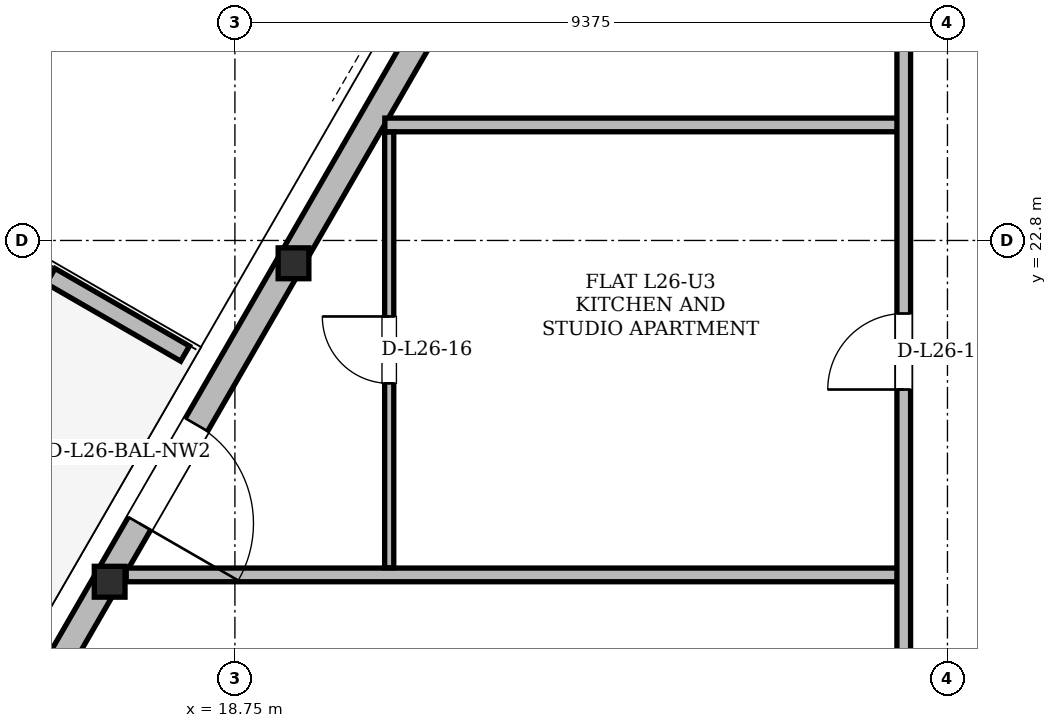
"""IFC4 building model, lengths in metres.
Left out: names, types, materials, properties, quantities, classifications, styles, units other than length and angle.
Written with IfcOpenShell. Run it as: python <this file> out.ifc"""

import sys

from ifc_helpers import new_model, si_unit, direction, frame, frame_2d, origin, origin_2d, place, context, subcontext, project, spatial, polyline, rectangle, i_section, outline, extrude, element, fill, save


model = new_model("IFC4")
c1 = context("Model", 3, precision=1e-05, world=origin(), true_north=direction((0.0, 1.0)))
c2 = subcontext(c1, "Body", "Model", "MODEL_VIEW")
j1 = project(units=[si_unit("LENGTHUNIT", "METRE"), si_unit("PLANEANGLEUNIT", "RADIAN")], contexts=[c1])
p1 = place(None, origin())
s1 = spatial("IfcSite", under=j1, at=p1, CompositionType="ELEMENT")
p2 = place(p1, origin())
s2 = spatial("IfcBuilding", under=s1, at=p2, CompositionType="ELEMENT")
p3 = place(p2, frame((0.0, 0.0, 100.5)))
s3 = spatial("IfcBuildingStorey", under=s2, at=p3, CompositionType="ELEMENT", Elevation=100.5)
p4 = place(p3, frame((19.487, 22.528, 0.004), z_axis=(0.018758346864, -0.015903815819, 0.999697550795), x_axis=(0.646685251635, 0.762756963467, 0.0)))
e1 = element("IfcColumn", 1, at=p4, inside=s3, PredefinedType="COLUMN", context=c2, shape_type="SweptSolid", body=[
    extrude(i_section(OverallWidth=0.404, OverallDepth=0.406, WebThickness=0.027, FlangeThickness=0.044, at=origin_2d()), origin(), (0.0, 0.0, 1.0), 3.592),
])
p5 = place(p3, frame((17.071, 18.344, 0.004), z_axis=(0.01726279285, -0.018554104126, 0.999678819023), x_axis=(0.732124530996, 0.681170809059, 0.0)))
e2 = element("IfcColumn", 2, at=p5, inside=s3, PredefinedType="COLUMN", context=c2, shape_type="SweptSolid", body=[
    extrude(i_section(OverallWidth=0.404, OverallDepth=0.406, WebThickness=0.027, FlangeThickness=0.044, at=origin_2d()), origin(), (0.0, 0.0, 1.0), 3.592),
])
p6 = place(p3, frame((31.568, 43.453, 0.0), z_axis=(0.0, 0.0, 1.0), x_axis=(-0.500002056916, -0.86602421622, 0.0)))
e3 = element("IfcWall", 3, at=p6, inside=s3, PredefinedType="SOLIDWALL", context=c2, shape_type="SweptSolid", body=[
    extrude(rectangle(XDim=34.516, YDim=0.34, at=frame_2d((17.258, 0.0))), origin(), (0.0, 0.0, 1.0), 2.578),
])
p7 = place(p6, frame((8.034, 0.0, 0.0)))
e4 = element("IfcOpeningElement", 4, at=p7, cuts=e3, PredefinedType="OPENING", context=c2, shape_type="SweptSolid", body=[
    extrude(rectangle(XDim=1.5, YDim=2.2, at=frame_2d((0.75, 1.1))), frame((0.0, 0.17, 0.0), z_axis=(0.0, -1.0, 0.0), x_axis=(1.0, 0.0, 0.0)), (0.0, 0.0, 1.0), 0.34),
])
p8 = place(p6, frame((26.647, 0.0, 0.0)))
e5 = element("IfcOpeningElement", 5, at=p8, cuts=e3, PredefinedType="OPENING", context=c2, shape_type="SweptSolid", body=[
    extrude(rectangle(XDim=1.5, YDim=2.2, at=frame_2d((0.75, 1.1))), frame((0.0, 0.17, 0.0), z_axis=(0.0, -1.0, 0.0), x_axis=(1.0, 0.0, 0.0)), (0.0, 0.0, 1.0), 0.34),
])
p9 = place(p6, frame((31.672, 0.0, 0.85)))
e6 = element("IfcOpeningElement", 6, at=p9, cuts=e3, PredefinedType="OPENING", context=c2, shape_type="SweptSolid", body=[
    extrude(rectangle(XDim=1.6, YDim=1.618, at=frame_2d((0.8, 0.809))), frame((0.0, 0.17, 0.0), z_axis=(0.0, -1.0, 0.0), x_axis=(1.0, 0.0, 0.0)), (0.0, 0.0, 1.0), 0.34),
])
p10 = place(p6, frame((11.262, 0.0, 0.85)))
e7 = element("IfcOpeningElement", 7, at=p10, cuts=e3, PredefinedType="OPENING", context=c2, shape_type="SweptSolid", body=[
    extrude(rectangle(XDim=1.8, YDim=1.618, at=frame_2d((0.9, 0.809))), frame((0.0, 0.17, 0.0), z_axis=(0.0, -1.0, 0.0), x_axis=(1.0, 0.0, 0.0)), (0.0, 0.0, 1.0), 0.34),
])
p11 = place(p6, frame((18.602, 0.0, 0.85)))
e8 = element("IfcOpeningElement", 8, at=p11, cuts=e3, PredefinedType="OPENING", context=c2, shape_type="SweptSolid", body=[
    extrude(rectangle(XDim=1.2, YDim=1.48, at=frame_2d((0.6, 0.74))), frame((0.0, 0.17, 0.0), z_axis=(0.0, -1.0, 0.0), x_axis=(1.0, 0.0, 0.0)), (0.0, 0.0, 1.0), 0.34),
])
p12 = place(p6, frame((1.763, 0.0, 0.85)))
e9 = element("IfcOpeningElement", 9, at=p12, cuts=e3, PredefinedType="OPENING", context=c2, shape_type="SweptSolid", body=[
    extrude(rectangle(XDim=1.6, YDim=1.618, at=frame_2d((0.8, 0.809))), frame((0.0, 0.17, 0.0), z_axis=(0.0, -1.0, 0.0), x_axis=(1.0, 0.0, 0.0)), (0.0, 0.0, 1.0), 0.34),
])
p13 = place(p3, frame((18.094, 21.311, 0.0), z_axis=(0.0, 0.0, 1.0), x_axis=(-0.866012356593, 0.500022597718, 0.0)))
e10 = element("IfcWall", 10, at=p13, inside=s3, PredefinedType="PARAPET", context=c2, shape_type="SweptSolid", body=[
    extrude(outline(polyline([(0.0, 0.0), (2.042, 0.0), (2.042, 1.1), (0.0, 1.32), (0.0, 0.0)])), frame((0.0, 0.115, 0.0), z_axis=(0.0, -1.0, 0.0), x_axis=(1.0, 0.0, 0.0)), (0.0, 0.0, 1.0), 0.23),
])
p14 = place(p3, frame((17.32, 18.4, 0.0), z_axis=(0.0, 0.0, 1.0), x_axis=(1.0, 0.0, 0.0)))
e11 = element("IfcWall", 11, at=p14, inside=s3, PredefinedType="PARTITIONING", context=c2, shape_type="SweptSolid", body=[
    extrude(rectangle(XDim=10.29, YDim=0.18, at=frame_2d((5.145, 0.0))), origin(), (0.0, 0.0, 1.0), 3.36),
])
p15 = place(p3, frame((20.723, 24.32, 0.0), z_axis=(0.0, 0.0, 1.0), x_axis=(1.0, 0.0, 0.0)))
e12 = element("IfcWall", 12, at=p15, inside=s3, PredefinedType="PARTITIONING", context=c2, shape_type="SweptSolid", body=[
    extrude(rectangle(XDim=6.887, YDim=0.18, at=frame_2d((3.444, 0.0))), origin(), (0.0, 0.0, 1.0), 3.36),
])
p16 = place(p3, frame((20.78, 18.494, 0.0), z_axis=(0.0, 0.0, 1.0), x_axis=(0.0, 1.0, 0.0)))
e13 = element("IfcWall", 13, at=p16, inside=s3, PredefinedType="PARTITIONING", context=c2, shape_type="SweptSolid", body=[
    extrude(rectangle(XDim=5.732, YDim=0.12, at=frame_2d((2.866, 0.0))), origin(), (0.0, 0.0, 1.0), 3.36),
])
p17 = place(p16, frame((2.426, 0.0, 0.0)))
e14 = element("IfcOpeningElement", 14, at=p17, cuts=e13, PredefinedType="OPENING", context=c2, shape_type="SweptSolid", body=[
    extrude(rectangle(XDim=0.88, YDim=2.08, at=frame_2d((0.44, 1.04))), frame((0.0, 0.06, 0.0), z_axis=(0.0, -1.0, 0.0), x_axis=(1.0, 0.0, 0.0)), (0.0, 0.0, 1.0), 0.12),
])
p18 = place(p3, frame((27.55, 11.044, 0.0), z_axis=(0.0, 0.0, 1.0), x_axis=(0.0, 1.0, 0.0)))
e15 = element("IfcWall", 15, at=p18, inside=s3, PredefinedType="PARTITIONING", context=c2, shape_type="SweptSolid", body=[
    extrude(rectangle(XDim=14.832, YDim=0.18, at=frame_2d((7.416, 0.0))), origin(), (0.0, 0.0, 1.0), 2.814),
])
p19 = place(p18, frame((9.795, 0.0, 0.0)))
e16 = element("IfcOpeningElement", 16, at=p19, cuts=e15, PredefinedType="OPENING", context=c2, shape_type="SweptSolid", body=[
    extrude(rectangle(XDim=1.0, YDim=2.18, at=frame_2d((0.5, 1.09))), frame((0.0, 0.09, 0.0), z_axis=(0.0, -1.0, 0.0), x_axis=(1.0, 0.0, 0.0)), (0.0, 0.0, 1.0), 0.18),
])
p20 = place(p8, origin())
e17 = element("IfcDoor", 17, at=p20, inside=s3, OperationType="SINGLE_SWING_RIGHT", PredefinedType="DOOR", context=c2, shape_type="SweptSolid", body=[
    extrude(rectangle(XDim=1.5, YDim=2.2, at=frame_2d((0.75, 1.1))), frame((0.0, 0.025, 0.0), z_axis=(0.0, -1.0, 0.0), x_axis=(1.0, 0.0, 0.0)), (0.0, 0.0, 1.0), 0.05),
])
fill(e5, e17)
p21 = place(p17, origin())
e18 = element("IfcDoor", 18, at=p21, inside=s3, OperationType="SINGLE_SWING_RIGHT", PredefinedType="DOOR", context=c2, shape_type="SweptSolid", body=[
    extrude(rectangle(XDim=0.88, YDim=2.08, at=frame_2d((0.44, 1.04))), frame((0.0, 0.025, 0.0), z_axis=(0.0, -1.0, 0.0), x_axis=(1.0, 0.0, 0.0)), (0.0, 0.0, 1.0), 0.05),
])
fill(e14, e18)
p22 = place(p19, origin())
e19 = element("IfcDoor", 19, at=p22, inside=s3, OperationType="SINGLE_SWING_LEFT", PredefinedType="DOOR", context=c2, shape_type="SweptSolid", body=[
    extrude(rectangle(XDim=1.0, YDim=2.18, at=frame_2d((0.5, 1.09))), frame((0.0, 0.025, 0.0), z_axis=(0.0, -1.0, 0.0), x_axis=(1.0, 0.0, 0.0)), (0.0, 0.0, 1.0), 0.05),
])
fill(e16, e19)
save(model, sys.argv[1])
